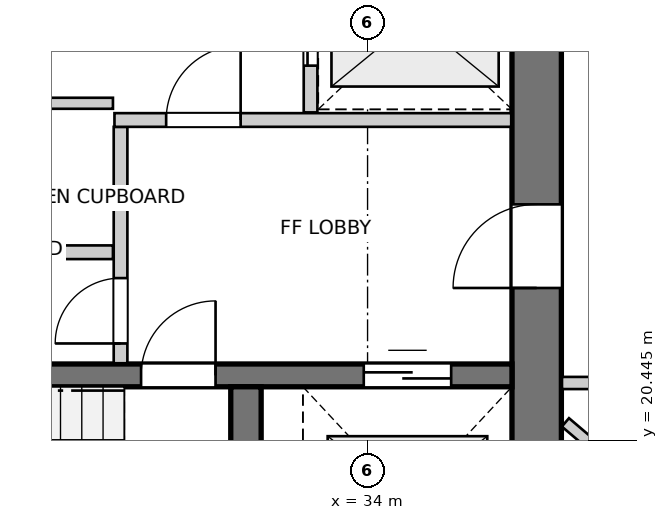
"""IFC4 building model, lengths in metres.
Left out: names, types, materials, properties, quantities, classifications, styles, units other than length and angle.
Written with IfcOpenShell. Run it as: python <this file> out.ifc"""

import sys

from ifc_helpers import new_model, si_unit, direction, frame, frame_2d, origin, place, context, subcontext, project, spatial, rectangle, extrude, source, transform, mapped, element, fill, save


model = new_model("IFC4")
c1 = context("Model", 3, precision=1e-05, world=origin(), true_north=direction((0.0, 1.0)))
c2 = subcontext(c1, "Body", "Model", "MODEL_VIEW")
j1 = project(units=[si_unit("LENGTHUNIT", "METRE"), si_unit("PLANEANGLEUNIT", "RADIAN")], contexts=[c1])
p1 = place(None, origin())
s1 = spatial("IfcSite", under=j1, at=p1, CompositionType="ELEMENT")
p2 = place(p1, origin())
s2 = spatial("IfcBuilding", under=s1, at=p2, CompositionType="ELEMENT")
p3 = place(p2, frame((0.0, 0.0, 161.8)))
s3 = spatial("IfcBuildingStorey", under=s2, at=p3, CompositionType="ELEMENT", Elevation=161.8)
p4 = place(p3, frame((36.225, 18.2, 0.0), z_axis=(0.0, 0.0, 1.0), x_axis=(0.0, 1.0, 0.0)))
e1 = element("IfcWall", 1, at=p4, inside=s3, PredefinedType="SHEAR", context=c2, shape_type="SweptSolid", body=[
    extrude(rectangle(XDim=15.6, YDim=0.65, at=frame_2d((7.8, 0.0))), origin(), (0.0, 0.0, 1.0), 2.95),
])
p5 = place(p4, frame((4.25, 0.0, 0.0)))
e2 = element("IfcOpeningElement", 2, at=p5, cuts=e1, PredefinedType="OPENING", context=c2, shape_type="SweptSolid", body=[
    extrude(rectangle(XDim=1.1, YDim=2.15, at=frame_2d((0.55, 1.075))), frame((0.0, 0.335, 0.0), z_axis=(0.0, -1.0, 0.0), x_axis=(1.0, 0.0, 0.0)), (0.0, 0.0, 1.0), 0.67),
])
p6 = place(p4, frame((10.25, 0.0, 0.0)))
e3 = element("IfcOpeningElement", 3, at=p6, cuts=e1, PredefinedType="OPENING", context=c2, shape_type="SweptSolid", body=[
    extrude(rectangle(XDim=1.1, YDim=2.15, at=frame_2d((0.55, 1.075))), frame((0.0, 0.335, 0.0), z_axis=(0.0, -1.0, 0.0), x_axis=(1.0, 0.0, 0.0)), (0.0, 0.0, 1.0), 0.67),
])
p7 = place(p3, frame((24.8, 21.3, 0.0), z_axis=(0.0, 0.0, 1.0), x_axis=(1.0, 0.0, 0.0)))
e4 = element("IfcWall", 4, at=p7, inside=s3, PredefinedType="SHEAR", context=c2, shape_type="SweptSolid", body=[
    extrude(rectangle(XDim=11.1, YDim=0.3, at=frame_2d((5.55, 0.0))), origin(), (0.0, 0.0, 1.0), 2.95),
])
p8 = place(p7, frame((6.22, 0.0, 0.0)))
e5 = element("IfcOpeningElement", 5, at=p8, cuts=e4, PredefinedType="OPENING", context=c2, shape_type="SweptSolid", body=[
    extrude(rectangle(XDim=0.98, YDim=2.15, at=frame_2d((0.49, 1.075))), frame((0.0, 0.16, 0.0), z_axis=(0.0, -1.0, 0.0), x_axis=(1.0, 0.0, 0.0)), (0.0, 0.0, 1.0), 0.32),
])
p9 = place(p7, frame((9.15, 0.0, 0.0)))
e6 = element("IfcOpeningElement", 6, at=p9, cuts=e4, PredefinedType="OPENING", context=c2, shape_type="SweptSolid", body=[
    extrude(rectangle(XDim=1.15, YDim=2.15, at=frame_2d((0.575, 1.075))), frame((0.0, 0.16, 0.0), z_axis=(0.0, -1.0, 0.0), x_axis=(1.0, 0.0, 0.0)), (0.0, 0.0, 1.0), 0.32),
])
p10 = place(p3, frame((32.4, 18.2, 0.0), z_axis=(0.0, 0.0, 1.0), x_axis=(0.0, 1.0, 0.0)))
e7 = element("IfcWall", 7, at=p10, inside=s3, PredefinedType="SHEAR", context=c2, shape_type="SweptSolid", body=[
    extrude(rectangle(XDim=2.95, YDim=0.4, at=frame_2d((1.475, 0.0))), origin(), (0.0, 0.0, 1.0), 2.95),
])
p11 = place(p3, frame((30.75, 21.46, 0.0), z_axis=(0.0, 0.0, 1.0), x_axis=(0.0, 1.0, 0.0)))
e8 = element("IfcWall", 8, at=p11, inside=s3, PredefinedType="PARTITIONING", context=c2, shape_type="SweptSolid", body=[
    extrude(rectangle(XDim=3.11, YDim=0.18, at=frame_2d((1.555, 0.0))), origin(), (0.0, 0.0, 1.0), 2.95),
])
p12 = place(p11, frame((0.26, 0.0, 0.0)))
e9 = element("IfcOpeningElement", 9, at=p12, cuts=e8, PredefinedType="OPENING", context=c2, shape_type="SweptSolid", body=[
    extrude(rectangle(XDim=0.86, YDim=2.05, at=frame_2d((0.43, 1.025))), frame((0.0, 0.1, 0.0), z_axis=(0.0, -1.0, 0.0), x_axis=(1.0, 0.0, 0.0)), (0.0, 0.0, 1.0), 0.2),
])
p13 = place(p3, frame((30.67, 24.66, 0.0), z_axis=(0.0, 0.0, 1.0), x_axis=(1.0, 0.0, 0.0)))
e10 = element("IfcWall", 10, at=p13, inside=s3, PredefinedType="PARTITIONING", context=c2, shape_type="SweptSolid", body=[
    extrude(rectangle(XDim=5.22, YDim=0.18, at=frame_2d((2.61, 0.0))), origin(), (0.0, 0.0, 1.0), 2.95),
])
p14 = place(p13, frame((0.68, 0.0, 0.0)))
e11 = element("IfcOpeningElement", 11, at=p14, cuts=e10, PredefinedType="OPENING", context=c2, shape_type="SweptSolid", body=[
    extrude(rectangle(XDim=0.98, YDim=2.15, at=frame_2d((0.49, 1.075))), frame((0.0, 0.1, 0.0), z_axis=(0.0, -1.0, 0.0), x_axis=(1.0, 0.0, 0.0)), (0.0, 0.0, 1.0), 0.2),
])
p15 = place(p3, frame((33.25, 24.76, 0.0), z_axis=(0.0, 0.0, 1.0), x_axis=(0.0, 1.0, 0.0)))
e12 = element("IfcWall", 12, at=p15, inside=s3, PredefinedType="PARTITIONING", context=c2, shape_type="SweptSolid", body=[
    extrude(rectangle(XDim=2.48, YDim=0.18, at=frame_2d((1.24, 0.0))), origin(), (0.0, 0.0, 1.0), 2.95),
])
p16 = place(p15, frame((0.615, 0.0, 0.0)))
e13 = element("IfcOpeningElement", 13, at=p16, cuts=e12, PredefinedType="OPENING", context=c2, shape_type="SweptSolid", body=[
    extrude(rectangle(XDim=1.25, YDim=2.15, at=frame_2d((0.625, 1.075))), frame((0.0, 0.1, 0.0), z_axis=(0.0, -1.0, 0.0), x_axis=(1.0, 0.0, 0.0)), (0.0, 0.0, 1.0), 0.2),
])
p17 = place(p3, frame((24.81, 22.92, 0.0), z_axis=(0.0, 0.0, 1.0), x_axis=(1.0, 0.0, 0.0)))
e14 = element("IfcWall", 14, at=p17, inside=s3, PredefinedType="PARTITIONING", context=c2, shape_type="SweptSolid", body=[
    extrude(rectangle(XDim=5.84, YDim=0.18, at=frame_2d((2.92, 0.0))), origin(), (0.0, 0.0, 1.0), 2.95),
])
p18 = place(p3, frame((28.13, 24.88, 0.0), z_axis=(0.0, 0.0, 1.0), x_axis=(1.0, 0.0, 0.0)))
e15 = element("IfcWall", 15, at=p18, inside=s3, PredefinedType="PARTITIONING", context=c2, shape_type="SweptSolid", body=[
    extrude(rectangle(XDim=2.52, YDim=0.145, at=frame_2d((1.26, 0.0))), origin(), (0.0, 0.0, 1.0), 2.95),
])
p19 = place(p18, frame((0.82, 0.0, 0.0)))
e16 = element("IfcOpeningElement", 16, at=p19, cuts=e15, PredefinedType="OPENING", context=c2, shape_type="SweptSolid", body=[
    extrude(rectangle(XDim=0.86, YDim=2.05, at=frame_2d((0.43, 1.025))), frame((0.0, 0.083, 0.0), z_axis=(0.0, -1.0, 0.0), x_axis=(1.0, 0.0, 0.0)), (0.0, 0.0, 1.0), 0.165),
])
p20 = place(p3, frame((36.603, 20.682, 0.0), z_axis=(0.0, 0.0, 1.0), x_axis=(0.761710074833, -0.647918020971, 0.0)))
e17 = element("IfcWall", 17, at=p20, inside=s3, PredefinedType="PARTITIONING", context=c2, shape_type="SweptSolid", body=[
    extrude(rectangle(XDim=7.359, YDim=0.145, at=frame_2d((3.68, 0.0))), origin(), (0.0, 0.0, 1.0), 2.95),
])
p21 = place(p3, frame((36.558, 21.2, 0.0), z_axis=(0.0, 0.0, 1.0), x_axis=(1.0, 0.0, 0.0)))
e18 = element("IfcWall", 18, at=p21, inside=s3, PredefinedType="PARTITIONING", context=c2, shape_type="SweptSolid", body=[
    extrude(rectangle(XDim=1.684, YDim=0.16, at=frame_2d((0.842, 0.0))), origin(), (0.0, 0.0, 1.0), 2.95),
])
m1 = source(origin(), c2, "Body", "SweptSolid", [
    extrude(rectangle(XDim=0.98, YDim=2.15, at=frame_2d((0.49, 1.075))), frame((0.0, 0.025, 0.0), z_axis=(0.0, -1.0, 0.0), x_axis=(1.0, 0.0, 0.0)), (0.0, 0.0, 1.0), 0.05),
])
p22 = place(p8, origin())
e19 = element("IfcDoor", 19, at=p22, inside=s3, OperationType="SINGLE_SWING_RIGHT", PredefinedType="DOOR", context=c2, shape_type="MappedRepresentation", body=[
    mapped(m1, transform((0.0, 0.0, 0.0), x_axis=(1.0, 0.0, 0.0), y_axis=(0.0, 1.0, 0.0), z_axis=(0.0, 0.0, 1.0), scale=1.0)),
])
fill(e5, e19)
m2 = source(origin(), c2, "Body", "SweptSolid", [
    extrude(rectangle(XDim=1.15, YDim=2.15, at=frame_2d((0.575, 1.075))), frame((0.0, 0.025, 0.0), z_axis=(0.0, -1.0, 0.0), x_axis=(1.0, 0.0, 0.0)), (0.0, 0.0, 1.0), 0.05),
])
p23 = place(p9, origin())
e20 = element("IfcDoor", 20, at=p23, inside=s3, OperationType="DOUBLE_DOOR_SLIDING", PredefinedType="DOOR", context=c2, shape_type="MappedRepresentation", body=[
    mapped(m2, transform((0.0, 0.0, 0.0), x_axis=(1.0, 0.0, 0.0), y_axis=(0.0, 1.0, 0.0), z_axis=(0.0, 0.0, 1.0), scale=1.0)),
])
fill(e6, e20)
m3 = source(origin(), c2, "Body", "SweptSolid", [
    extrude(rectangle(XDim=1.1, YDim=2.15, at=frame_2d((0.55, 1.075))), frame((0.0, 0.025, 0.0), z_axis=(0.0, -1.0, 0.0), x_axis=(1.0, 0.0, 0.0)), (0.0, 0.0, 1.0), 0.05),
])
p24 = place(p5, origin())
e21 = element("IfcDoor", 21, at=p24, inside=s3, OperationType="SINGLE_SWING_LEFT", PredefinedType="DOOR", context=c2, shape_type="MappedRepresentation", body=[
    mapped(m3, transform((0.0, 0.0, 0.0), x_axis=(1.0, 0.0, 0.0), y_axis=(0.0, 1.0, 0.0), z_axis=(0.0, 0.0, 1.0), scale=1.0)),
])
fill(e2, e21)
m4 = source(origin(), c2, "Body", "SweptSolid", [
    extrude(rectangle(XDim=0.86, YDim=2.05, at=frame_2d((0.43, 1.025))), frame((0.0, 0.025, 0.0), z_axis=(0.0, -1.0, 0.0), x_axis=(1.0, 0.0, 0.0)), (0.0, 0.0, 1.0), 0.05),
])
p25 = place(p12, origin())
e22 = element("IfcDoor", 22, at=p25, inside=s3, OperationType="SINGLE_SWING_LEFT", PredefinedType="DOOR", context=c2, shape_type="MappedRepresentation", body=[
    mapped(m4, transform((0.0, 0.0, 0.0), x_axis=(1.0, 0.0, 0.0), y_axis=(0.0, 1.0, 0.0), z_axis=(0.0, 0.0, 1.0), scale=1.0)),
])
fill(e9, e22)
p26 = place(p14, origin())
e23 = element("IfcDoor", 23, at=p26, inside=s3, OperationType="SINGLE_SWING_RIGHT", PredefinedType="DOOR", context=c2, shape_type="MappedRepresentation", body=[
    mapped(m1, transform((0.0, 0.0, 0.0), x_axis=(1.0, 0.0, 0.0), y_axis=(0.0, 1.0, 0.0), z_axis=(0.0, 0.0, 1.0), scale=1.0)),
])
fill(e11, e23)
m5 = source(origin(), c2, "Body", "SweptSolid", [
    extrude(rectangle(XDim=1.25, YDim=2.15, at=frame_2d((0.625, 1.075))), frame((0.0, 0.025, 0.0), z_axis=(0.0, -1.0, 0.0), x_axis=(1.0, 0.0, 0.0)), (0.0, 0.0, 1.0), 0.05),
])
p27 = place(p16, origin())
e24 = element("IfcDoor", 24, at=p27, inside=s3, OperationType="DOUBLE_DOOR_SLIDING", PredefinedType="DOOR", context=c2, shape_type="MappedRepresentation", body=[
    mapped(m5, transform((0.0, 0.0, 0.0), x_axis=(1.0, 0.0, 0.0), y_axis=(0.0, 1.0, 0.0), z_axis=(0.0, 0.0, 1.0), scale=1.0)),
])
fill(e13, e24)
save(model, sys.argv[1])
